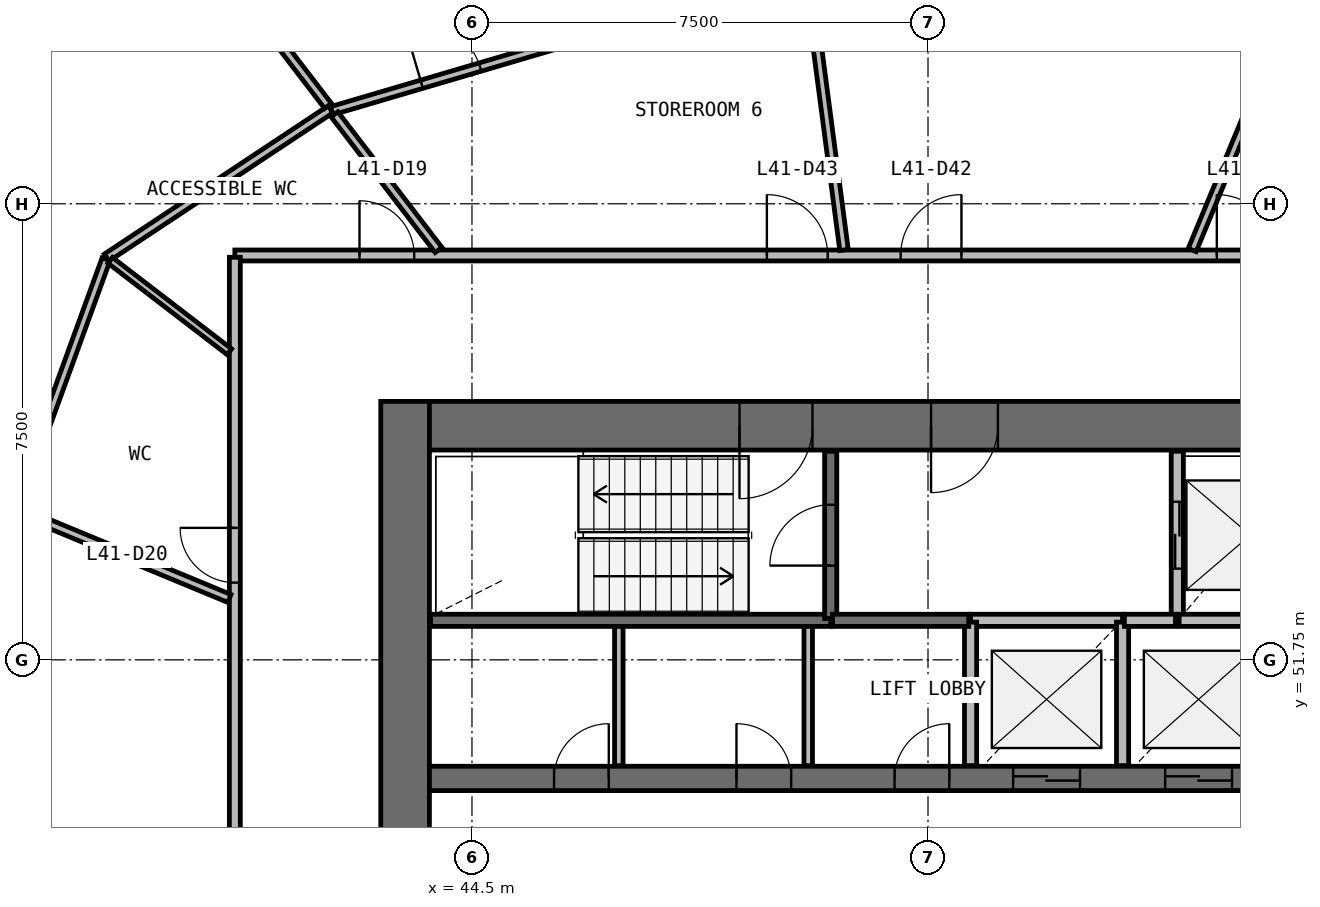
"""IFC4 building model, lengths in metres.
Left out: names, types, materials, properties, quantities, classifications, styles, units other than length and angle.
Written with IfcOpenShell. Run it as: python <this file> out.ifc"""

import sys

from ifc_helpers import new_model, si_unit, direction, frame, frame_2d, origin, place, context, subcontext, project, spatial, rectangle, extrude, source, transform, mapped, element, fill, save


model = new_model("IFC4")
c1 = context("Model", 3, precision=1e-05, world=origin(), true_north=direction((0.0, 1.0)))
c2 = subcontext(c1, "Body", "Model", "MODEL_VIEW")
j1 = project(units=[si_unit("LENGTHUNIT", "METRE"), si_unit("PLANEANGLEUNIT", "RADIAN")], contexts=[c1])
p1 = place(None, origin())
s1 = spatial("IfcSite", under=j1, at=p1, CompositionType="ELEMENT")
p2 = place(p1, origin())
s2 = spatial("IfcBuilding", under=s1, at=p2, CompositionType="ELEMENT")
p3 = place(p2, frame((0.0, 0.0, 172.1)))
s3 = spatial("IfcBuildingStorey", under=s2, at=p3, CompositionType="ELEMENT", Elevation=172.1)
p4 = place(p3, frame((43.4, 56.0, 0.0), z_axis=(0.0, 0.0, 1.0), x_axis=(0.0, -1.0, 0.0)))
e1 = element("IfcWall", 1, at=p4, inside=s3, PredefinedType="SHEAR", context=c2, shape_type="SweptSolid", body=[
    extrude(rectangle(XDim=16.0, YDim=0.8, at=frame_2d((8.0, 0.0))), origin(), (0.0, 0.0, 1.0), 3.9),
])
p5 = place(p4, frame((7.1, 0.0, 0.0)))
e2 = element("IfcOpeningElement", 2, at=p5, cuts=e1, PredefinedType="OPENING", context=c2, shape_type="SweptSolid", body=[
    extrude(rectangle(XDim=1.8, YDim=2.1, at=frame_2d((0.9, 1.05))), frame((0.0, 0.41, 0.0), z_axis=(0.0, -1.0, 0.0), x_axis=(1.0, 0.0, 0.0)), (0.0, 0.0, 1.0), 0.82),
])
p6 = place(p3, frame((60.2, 55.6, 0.0), z_axis=(0.0, 0.0, 1.0), x_axis=(-1.0, 0.0, 0.0)))
e3 = element("IfcWall", 3, at=p6, inside=s3, PredefinedType="SHEAR", context=c2, shape_type="SweptSolid", body=[
    extrude(rectangle(XDim=16.4, YDim=0.8, at=frame_2d((8.2, 0.0))), origin(), (0.0, 0.0, 1.0), 3.9),
])
p7 = place(p6, frame((0.2, 0.0, 0.0)))
e4 = element("IfcOpeningElement", 4, at=p7, cuts=e3, PredefinedType="OPENING", context=c2, shape_type="SweptSolid", body=[
    extrude(rectangle(XDim=1.1, YDim=2.1, at=frame_2d((0.55, 1.05))), frame((0.0, 0.41, 0.0), z_axis=(0.0, -1.0, 0.0), x_axis=(1.0, 0.0, 0.0)), (0.0, 0.0, 1.0), 0.82),
])
p8 = place(p6, frame((10.1, 0.0, 0.0)))
e5 = element("IfcOpeningElement", 5, at=p8, cuts=e3, PredefinedType="OPENING", context=c2, shape_type="SweptSolid", body=[
    extrude(rectangle(XDim=1.2, YDim=2.1, at=frame_2d((0.6, 1.05))), frame((0.0, 0.41, 0.0), z_axis=(0.0, -1.0, 0.0), x_axis=(1.0, 0.0, 0.0)), (0.0, 0.0, 1.0), 0.82),
])
p9 = place(p6, frame((7.05, 0.0, 0.0)))
e6 = element("IfcOpeningElement", 6, at=p9, cuts=e3, PredefinedType="OPENING", context=c2, shape_type="SweptSolid", body=[
    extrude(rectangle(XDim=1.1, YDim=2.1, at=frame_2d((0.55, 1.05))), frame((0.0, 0.41, 0.0), z_axis=(0.0, -1.0, 0.0), x_axis=(1.0, 0.0, 0.0)), (0.0, 0.0, 1.0), 0.82),
])
p10 = place(p3, frame((43.8, 49.8, 0.0), z_axis=(0.0, 0.0, 1.0), x_axis=(1.0, 0.0, 0.0)))
e7 = element("IfcWall", 7, at=p10, inside=s3, PredefinedType="SHEAR", context=c2, shape_type="SweptSolid", body=[
    extrude(rectangle(XDim=16.4, YDim=0.4, at=frame_2d((8.2, 0.0))), origin(), (0.0, 0.0, 1.0), 3.9),
])
p11 = place(p10, frame((9.6, 0.0, 0.0)))
e8 = element("IfcOpeningElement", 8, at=p11, cuts=e7, PredefinedType="OPENING", context=c2, shape_type="SweptSolid", body=[
    extrude(rectangle(XDim=1.1, YDim=2.1, at=frame_2d((0.55, 1.05))), frame((0.0, 0.21, 0.0), z_axis=(0.0, -1.0, 0.0), x_axis=(1.0, 0.0, 0.0)), (0.0, 0.0, 1.0), 0.42),
])
p12 = place(p10, frame((12.1, 0.0, 0.0)))
e9 = element("IfcOpeningElement", 9, at=p12, cuts=e7, PredefinedType="OPENING", context=c2, shape_type="SweptSolid", body=[
    extrude(rectangle(XDim=1.1, YDim=2.1, at=frame_2d((0.55, 1.05))), frame((0.0, 0.21, 0.0), z_axis=(0.0, -1.0, 0.0), x_axis=(1.0, 0.0, 0.0)), (0.0, 0.0, 1.0), 0.42),
])
p13 = place(p10, frame((14.6, 0.0, 0.0)))
e10 = element("IfcOpeningElement", 10, at=p13, cuts=e7, PredefinedType="OPENING", context=c2, shape_type="SweptSolid", body=[
    extrude(rectangle(XDim=1.1, YDim=2.1, at=frame_2d((0.55, 1.05))), frame((0.0, 0.21, 0.0), z_axis=(0.0, -1.0, 0.0), x_axis=(1.0, 0.0, 0.0)), (0.0, 0.0, 1.0), 0.42),
])
p14 = place(p10, frame((2.05, 0.0, 0.0)))
e11 = element("IfcOpeningElement", 11, at=p14, cuts=e7, PredefinedType="OPENING", context=c2, shape_type="SweptSolid", body=[
    extrude(rectangle(XDim=0.9, YDim=2.1, at=frame_2d((0.45, 1.05))), frame((0.0, 0.21, 0.0), z_axis=(0.0, -1.0, 0.0), x_axis=(1.0, 0.0, 0.0)), (0.0, 0.0, 1.0), 0.42),
])
p15 = place(p10, frame((5.05, 0.0, 0.0)))
e12 = element("IfcOpeningElement", 12, at=p15, cuts=e7, PredefinedType="OPENING", context=c2, shape_type="SweptSolid", body=[
    extrude(rectangle(XDim=0.9, YDim=2.1, at=frame_2d((0.45, 1.05))), frame((0.0, 0.21, 0.0), z_axis=(0.0, -1.0, 0.0), x_axis=(1.0, 0.0, 0.0)), (0.0, 0.0, 1.0), 0.42),
])
p16 = place(p10, frame((7.65, 0.0, 0.0)))
e13 = element("IfcOpeningElement", 13, at=p16, cuts=e7, PredefinedType="OPENING", context=c2, shape_type="SweptSolid", body=[
    extrude(rectangle(XDim=0.9, YDim=2.1, at=frame_2d((0.45, 1.05))), frame((0.0, 0.21, 0.0), z_axis=(0.0, -1.0, 0.0), x_axis=(1.0, 0.0, 0.0)), (0.0, 0.0, 1.0), 0.42),
])
p17 = place(p3, frame((43.82, 52.4, 0.0), z_axis=(0.0, 0.0, 1.0), x_axis=(1.0, 0.0, 0.0)))
e14 = element("IfcWall", 14, at=p17, inside=s3, PredefinedType="SOLIDWALL", context=c2, shape_type="SweptSolid", body=[
    extrude(rectangle(XDim=6.58, YDim=0.2, at=frame_2d((3.29, 0.0))), origin(), (0.0, 0.0, 1.0), 3.58),
])
p18 = place(p3, frame((50.4, 52.43, 0.0), z_axis=(0.0, 0.0, 1.0), x_axis=(0.0, 1.0, 0.0)))
e15 = element("IfcWall", 15, at=p18, inside=s3, PredefinedType="SOLIDWALL", context=c2, shape_type="SweptSolid", body=[
    extrude(rectangle(XDim=2.75, YDim=0.2, at=frame_2d((1.375, 0.0))), origin(), (0.0, 0.0, 1.0), 3.58),
])
p19 = place(p18, frame((0.87, 0.0, 0.0)))
e16 = element("IfcOpeningElement", 16, at=p19, cuts=e15, PredefinedType="OPENING", context=c2, shape_type="SweptSolid", body=[
    extrude(rectangle(XDim=1.0, YDim=2.1, at=frame_2d((0.5, 1.05))), frame((0.0, 0.11, 0.0), z_axis=(0.0, -1.0, 0.0), x_axis=(1.0, 0.0, 0.0)), (0.0, 0.0, 1.0), 0.22),
])
p20 = place(p3, frame((56.1, 55.18, 0.0), z_axis=(0.0, 0.0, 1.0), x_axis=(0.0, -1.0, 0.0)))
e17 = element("IfcWall", 17, at=p20, inside=s3, PredefinedType="SOLIDWALL", context=c2, shape_type="SweptSolid", body=[
    extrude(rectangle(XDim=2.78, YDim=0.2, at=frame_2d((1.39, 0.0))), origin(), (0.0, 0.0, 1.0), 3.58),
])
p21 = place(p20, frame((0.83, 0.0, 0.0)))
e18 = element("IfcOpeningElement", 18, at=p21, cuts=e17, PredefinedType="OPENING", context=c2, shape_type="SweptSolid", body=[
    extrude(rectangle(XDim=1.1, YDim=2.1, at=frame_2d((0.55, 1.05))), frame((0.0, 0.11, 0.0), z_axis=(0.0, -1.0, 0.0), x_axis=(1.0, 0.0, 0.0)), (0.0, 0.0, 1.0), 0.22),
])
p22 = place(p3, frame((55.2, 52.4, 0.0), z_axis=(0.0, 0.0, 1.0), x_axis=(-1.0, 0.0, 0.0)))
e19 = element("IfcWall", 19, at=p22, inside=s3, PredefinedType="SOLIDWALL", context=c2, shape_type="SweptSolid", body=[
    extrude(rectangle(XDim=2.5, YDim=0.2, at=frame_2d((1.25, 0.0))), origin(), (0.0, 0.0, 1.0), 3.58),
])
for number, where, z_axis, x_axis in (
    (20, (52.7, 52.37, 0.0), (0.0, 0.0, 1.0), (0.0, -1.0, 0.0)),
    (21, (55.2, 50.01, 0.0), (0.0, 0.0, 1.0), (0.0, 1.0, 0.0)),
):
    element("IfcWall", number, at=place(p3, frame(where, z_axis=z_axis, x_axis=x_axis)), inside=s3, PredefinedType="SOLIDWALL", context=c2, shape_type="SweptSolid", body=[
        extrude(rectangle(XDim=2.36, YDim=0.2, at=frame_2d((1.18, 0.0))), origin(), (0.0, 0.0, 1.0), 3.58),
    ])
p23 = place(p3, frame((50.43, 52.4, 0.0), z_axis=(0.0, 0.0, 1.0), x_axis=(1.0, 0.0, 0.0)))
e22 = element("IfcWall", 22, at=p23, inside=s3, PredefinedType="SOLIDWALL", context=c2, shape_type="SweptSolid", body=[
    extrude(rectangle(XDim=2.24, YDim=0.2, at=frame_2d((1.12, 0.0))), origin(), (0.0, 0.0, 1.0), 3.58),
])
p24 = place(p3, frame((57.67, 52.4, 0.0), z_axis=(0.0, 0.0, 1.0), x_axis=(-1.0, 0.0, 0.0)))
e23 = element("IfcWall", 23, at=p24, inside=s3, PredefinedType="SOLIDWALL", context=c2, shape_type="SweptSolid", body=[
    extrude(rectangle(XDim=1.54, YDim=0.2, at=frame_2d((0.77, 0.0))), origin(), (0.0, 0.0, 1.0), 3.58),
])
p25 = place(p3, frame((56.07, 52.4, 0.0), z_axis=(0.0, 0.0, 1.0), x_axis=(-1.0, 0.0, 0.0)))
e24 = element("IfcWall", 24, at=p25, inside=s3, PredefinedType="SOLIDWALL", context=c2, shape_type="SweptSolid", body=[
    extrude(rectangle(XDim=0.84, YDim=0.2, at=frame_2d((0.42, 0.0))), origin(), (0.0, 0.0, 1.0), 3.58),
])
p26 = place(p3, frame((40.6, 58.4, 0.0), z_axis=(0.0, 0.0, 1.0), x_axis=(1.0, 0.0, 0.0)))
e25 = element("IfcWall", 25, at=p26, inside=s3, PredefinedType="PARTITIONING", context=c2, shape_type="SweptSolid", body=[
    extrude(rectangle(XDim=22.8, YDim=0.18, at=frame_2d((11.4, 0.0))), origin(), (0.0, 0.0, 1.0), 2.88),
])
p27 = place(p26, frame((2.05, 0.0, 0.0)))
e26 = element("IfcOpeningElement", 26, at=p27, cuts=e25, PredefinedType="OPENING", context=c2, shape_type="SweptSolid", body=[
    extrude(rectangle(XDim=0.9, YDim=2.1, at=frame_2d((0.45, 1.05))), frame((0.0, 0.1, 0.0), z_axis=(0.0, -1.0, 0.0), x_axis=(1.0, 0.0, 0.0)), (0.0, 0.0, 1.0), 0.2),
])
p28 = place(p26, frame((16.15, 0.0, 0.0)))
e27 = element("IfcOpeningElement", 27, at=p28, cuts=e25, PredefinedType="OPENING", context=c2, shape_type="SweptSolid", body=[
    extrude(rectangle(XDim=1.0, YDim=2.1, at=frame_2d((0.5, 1.05))), frame((0.0, 0.1, 0.0), z_axis=(0.0, -1.0, 0.0), x_axis=(1.0, 0.0, 0.0)), (0.0, 0.0, 1.0), 0.2),
])
p29 = place(p26, frame((10.95, 0.0, 0.0)))
e28 = element("IfcOpeningElement", 28, at=p29, cuts=e25, PredefinedType="OPENING", context=c2, shape_type="SweptSolid", body=[
    extrude(rectangle(XDim=1.0, YDim=2.1, at=frame_2d((0.5, 1.05))), frame((0.0, 0.1, 0.0), z_axis=(0.0, -1.0, 0.0), x_axis=(1.0, 0.0, 0.0)), (0.0, 0.0, 1.0), 0.2),
])
p30 = place(p26, frame((8.75, 0.0, 0.0)))
e29 = element("IfcOpeningElement", 29, at=p30, cuts=e25, PredefinedType="OPENING", context=c2, shape_type="SweptSolid", body=[
    extrude(rectangle(XDim=1.0, YDim=2.1, at=frame_2d((0.5, 1.05))), frame((0.0, 0.1, 0.0), z_axis=(0.0, -1.0, 0.0), x_axis=(1.0, 0.0, 0.0)), (0.0, 0.0, 1.0), 0.2),
])
p31 = place(p3, frame((40.6, 37.63, 0.0), z_axis=(0.0, 0.0, 1.0), x_axis=(0.0, 1.0, 0.0)))
e30 = element("IfcWall", 30, at=p31, inside=s3, PredefinedType="PARTITIONING", context=c2, shape_type="SweptSolid", body=[
    extrude(rectangle(XDim=20.74, YDim=0.18, at=frame_2d((10.37, 0.0))), origin(), (0.0, 0.0, 1.0), 2.88),
])
p32 = place(p31, frame((15.39, 0.0, 0.0)))
e31 = element("IfcOpeningElement", 31, at=p32, cuts=e30, PredefinedType="OPENING", context=c2, shape_type="SweptSolid", body=[
    extrude(rectangle(XDim=0.9, YDim=2.1, at=frame_2d((0.45, 1.05))), frame((0.0, 0.1, 0.0), z_axis=(0.0, -1.0, 0.0), x_axis=(1.0, 0.0, 0.0)), (0.0, 0.0, 1.0), 0.2),
])
p33 = place(p31, frame((9.89, 0.0, 0.0)))
e32 = element("IfcOpeningElement", 32, at=p33, cuts=e30, PredefinedType="OPENING", context=c2, shape_type="SweptSolid", body=[
    extrude(rectangle(XDim=1.0, YDim=2.1, at=frame_2d((0.5, 1.05))), frame((0.0, 0.1, 0.0), z_axis=(0.0, -1.0, 0.0), x_axis=(1.0, 0.0, 0.0)), (0.0, 0.0, 1.0), 0.2),
])
p34 = place(p3, frame((50.619, 58.49, 0.0), z_axis=(0.0, 0.0, 1.0), x_axis=(-0.130550630931, 0.99144164365, 0.0)))
e33 = element("IfcWall", 33, at=p34, inside=s3, PredefinedType="PARTITIONING", context=c2, shape_type="SweptSolid", body=[
    extrude(rectangle(XDim=4.402, YDim=0.14, at=frame_2d((2.201, 0.0))), origin(), (0.0, 0.0, 1.0), 2.88),
])
p35 = place(p3, frame((42.175, 60.804, 0.0), z_axis=(0.0, 0.0, 1.0), x_axis=(-0.833696109899, -0.552223502162, 0.0)))
e34 = element("IfcWall", 34, at=p35, inside=s3, PredefinedType="PARTITIONING", context=c2, shape_type="SweptSolid", body=[
    extrude(rectangle(XDim=4.417, YDim=0.14, at=frame_2d((2.209, 0.0))), origin(), (0.0, 0.0, 1.0), 2.88),
])
p36 = place(p3, frame((38.482, 58.337, 0.0), z_axis=(0.0, 0.0, 1.0), x_axis=(-0.341774383975, -0.939782033484, 0.0)))
e35 = element("IfcWall", 35, at=p36, inside=s3, PredefinedType="PARTITIONING", context=c2, shape_type="SweptSolid", body=[
    extrude(rectangle(XDim=4.381, YDim=0.14, at=frame_2d((2.19, 0.0))), origin(), (0.0, 0.0, 1.0), 2.88),
])
p37 = place(p3, frame((42.193, 60.781, 0.0), z_axis=(0.0, 0.0, 1.0), x_axis=(0.959388676041, 0.282087518838, 0.0)))
e36 = element("IfcWall", 36, at=p37, inside=s3, PredefinedType="PARTITIONING", context=c2, shape_type="SweptSolid", body=[
    extrude(rectangle(XDim=4.193, YDim=0.14, at=frame_2d((2.097, 0.0))), origin(), (0.0, 0.0, 1.0), 2.88),
])
p38 = place(p37, frame((1.543, 0.0, 0.0)))
e37 = element("IfcOpeningElement", 37, at=p38, cuts=e36, PredefinedType="OPENING", context=c2, shape_type="SweptSolid", body=[
    extrude(rectangle(XDim=1.0, YDim=2.1, at=frame_2d((0.5, 1.05))), frame((0.0, 0.08, 0.0), z_axis=(0.0, -1.0, 0.0), x_axis=(1.0, 0.0, 0.0)), (0.0, 0.0, 1.0), 0.16),
])
p39 = place(p3, frame((56.345, 58.49, 0.0), z_axis=(0.0, 0.0, 1.0), x_axis=(0.382659985547, 0.923889244153, 0.0)))
e38 = element("IfcWall", 38, at=p39, inside=s3, PredefinedType="PARTITIONING", context=c2, shape_type="SweptSolid", body=[
    extrude(rectangle(XDim=3.965, YDim=0.14, at=frame_2d((1.982, 0.0))), origin(), (0.0, 0.0, 1.0), 2.88),
])
p40 = place(p3, frame((40.51, 52.759, 0.0), z_axis=(0.0, 0.0, 1.0), x_axis=(-0.923870623115, 0.382704940842, 0.0)))
e39 = element("IfcWall", 39, at=p40, inside=s3, PredefinedType="PARTITIONING", context=c2, shape_type="SweptSolid", body=[
    extrude(rectangle(XDim=3.785, YDim=0.14, at=frame_2d((1.893, 0.0))), origin(), (0.0, 0.0, 1.0), 2.88),
])
p41 = place(p3, frame((43.951, 58.49, 0.0), z_axis=(0.0, 0.0, 1.0), x_axis=(-0.608715851353, 0.793388311177, 0.0)))
e40 = element("IfcWall", 40, at=p41, inside=s3, PredefinedType="PARTITIONING", context=c2, shape_type="SweptSolid", body=[
    extrude(rectangle(XDim=2.812, YDim=0.14, at=frame_2d((1.406, 0.0))), origin(), (0.0, 0.0, 1.0), 2.88),
])
for number, where, z_axis, x_axis in (
    (41, (46.915, 50.01, 0.0), (0.0, 0.0, 1.0), (0.0, 1.0, 0.0)),
    (42, (50.03, 50.01, 0.0), (0.0, 0.0, 1.0), (0.0, 1.0, 0.0)),
):
    element("IfcWall", number, at=place(p3, frame(where, z_axis=z_axis, x_axis=x_axis)), inside=s3, PredefinedType="PARTITIONING", context=c2, shape_type="SweptSolid", body=[
        extrude(rectangle(XDim=2.29, YDim=0.14, at=frame_2d((1.145, 0.0))), origin(), (0.0, 0.0, 1.0), 2.88),
    ])
p42 = place(p3, frame((42.132, 60.86, 0.0), z_axis=(0.0, 0.0, 1.0), x_axis=(-0.60873458163, 0.793373940288, 0.0)))
e43 = element("IfcWall", 43, at=p42, inside=s3, PredefinedType="PARTITIONING", context=c2, shape_type="SweptSolid", body=[
    extrude(rectangle(XDim=2.249, YDim=0.14, at=frame_2d((1.125, 0.0))), origin(), (0.0, 0.0, 1.0), 2.88),
])
p43 = place(p3, frame((40.51, 56.817, 0.0), z_axis=(0.0, 0.0, 1.0), x_axis=(-0.79340260872, 0.608697215762, 0.0)))
e44 = element("IfcWall", 44, at=p43, inside=s3, PredefinedType="PARTITIONING", context=c2, shape_type="SweptSolid", body=[
    extrude(rectangle(XDim=2.469, YDim=0.12, at=frame_2d((1.234, 0.0))), origin(), (0.0, 0.0, 1.0), 2.88),
])
m1 = source(origin(), c2, "Body", "SweptSolid", [
    extrude(rectangle(XDim=1.1, YDim=2.1, at=frame_2d((0.55, 1.05))), frame((0.0, 0.025, 0.0), z_axis=(0.0, -1.0, 0.0), x_axis=(1.0, 0.0, 0.0)), (0.0, 0.0, 1.0), 0.05),
])
p44 = place(p11, origin())
e45 = element("IfcDoor", 45, at=p44, inside=s3, OperationType="DOUBLE_DOOR_SLIDING", PredefinedType="USERDEFINED", context=c2, shape_type="MappedRepresentation", body=[
    mapped(m1, transform((0.0, 0.0, 0.0), scale=1.0)),
])
fill(e8, e45)
p45 = place(p12, origin())
e46 = element("IfcDoor", 46, at=p45, inside=s3, OperationType="DOUBLE_DOOR_SLIDING", PredefinedType="USERDEFINED", context=c2, shape_type="MappedRepresentation", body=[
    mapped(m1, transform((0.0, 0.0, 0.0), scale=1.0)),
])
fill(e9, e46)
p46 = place(p21, origin())
e47 = element("IfcDoor", 47, at=p46, inside=s3, OperationType="DOUBLE_DOOR_SLIDING", PredefinedType="USERDEFINED", context=c2, shape_type="MappedRepresentation", body=[
    mapped(m1, transform((0.0, 0.0, 0.0), scale=1.0)),
])
fill(e18, e47)
m2 = source(origin(), c2, "Body", "SweptSolid", [
    extrude(rectangle(XDim=1.2, YDim=2.1, at=frame_2d((0.6, 1.05))), frame((0.0, 0.025, 0.0), z_axis=(0.0, -1.0, 0.0), x_axis=(1.0, 0.0, 0.0)), (0.0, 0.0, 1.0), 0.05),
])
p47 = place(p8, origin())
e48 = element("IfcDoor", 48, at=p47, inside=s3, OperationType="SINGLE_SWING_RIGHT", PredefinedType="DOOR", context=c2, shape_type="MappedRepresentation", body=[
    mapped(m2, transform((0.0, 0.0, 0.0), scale=1.0)),
])
fill(e5, e48)
m3 = source(origin(), c2, "Body", "SweptSolid", [
    extrude(rectangle(XDim=1.0, YDim=2.1, at=frame_2d((0.5, 1.05))), frame((0.0, 0.025, 0.0), z_axis=(0.0, -1.0, 0.0), x_axis=(1.0, 0.0, 0.0)), (0.0, 0.0, 1.0), 0.05),
])
p48 = place(p19, origin())
e49 = element("IfcDoor", 49, at=p48, inside=s3, OperationType="SINGLE_SWING_LEFT", PredefinedType="DOOR", context=c2, shape_type="MappedRepresentation", body=[
    mapped(m3, transform((0.0, 0.0, 0.0), scale=1.0)),
])
fill(e16, e49)
m4 = source(origin(), c2, "Body", "SweptSolid", [
    extrude(rectangle(XDim=1.1, YDim=2.1, at=frame_2d((0.55, 1.05))), frame((0.0, 0.025, 0.0), z_axis=(0.0, -1.0, 0.0), x_axis=(1.0, 0.0, 0.0)), (0.0, 0.0, 1.0), 0.05),
])
p49 = place(p9, origin())
e50 = element("IfcDoor", 50, at=p49, inside=s3, OperationType="SINGLE_SWING_RIGHT", PredefinedType="DOOR", context=c2, shape_type="MappedRepresentation", body=[
    mapped(m4, transform((0.0, 0.0, 0.0), scale=1.0)),
])
fill(e6, e50)
m5 = source(origin(), c2, "Body", "SweptSolid", [
    extrude(rectangle(XDim=0.9, YDim=2.1, at=frame_2d((0.45, 1.05))), frame((0.0, 0.025, 0.0), z_axis=(0.0, -1.0, 0.0), x_axis=(1.0, 0.0, 0.0)), (0.0, 0.0, 1.0), 0.05),
])
p50 = place(p27, origin())
e51 = element("IfcDoor", 51, at=p50, inside=s3, OperationType="SINGLE_SWING_LEFT", PredefinedType="DOOR", context=c2, shape_type="MappedRepresentation", body=[
    mapped(m5, transform((0.0, 0.0, 0.0), scale=1.0)),
])
fill(e26, e51)
p51 = place(p32, origin())
e52 = element("IfcDoor", 52, at=p51, inside=s3, OperationType="SINGLE_SWING_RIGHT", PredefinedType="DOOR", context=c2, shape_type="MappedRepresentation", body=[
    mapped(m5, transform((0.0, 0.0, 0.0), scale=1.0)),
])
fill(e31, e52)
m6 = source(origin(), c2, "Body", "SweptSolid", [
    extrude(rectangle(XDim=1.0, YDim=2.1, at=frame_2d((0.5, 1.05))), frame((0.0, 0.025, 0.0), z_axis=(0.0, -1.0, 0.0), x_axis=(1.0, 0.0, 0.0)), (0.0, 0.0, 1.0), 0.05),
])
p52 = place(p28, origin())
e53 = element("IfcDoor", 53, at=p52, inside=s3, OperationType="SINGLE_SWING_LEFT", PredefinedType="DOOR", context=c2, shape_type="MappedRepresentation", body=[
    mapped(m6, transform((0.0, 0.0, 0.0), scale=1.0)),
])
fill(e27, e53)
p53 = place(p29, origin())
e54 = element("IfcDoor", 54, at=p53, inside=s3, OperationType="SINGLE_SWING_RIGHT", PredefinedType="DOOR", context=c2, shape_type="MappedRepresentation", body=[
    mapped(m6, transform((0.0, 0.0, 0.0), scale=1.0)),
])
fill(e28, e54)
p54 = place(p30, origin())
e55 = element("IfcDoor", 55, at=p54, inside=s3, OperationType="SINGLE_SWING_LEFT", PredefinedType="DOOR", context=c2, shape_type="MappedRepresentation", body=[
    mapped(m6, transform((0.0, 0.0, 0.0), scale=1.0)),
])
fill(e29, e55)
p55 = place(p38, origin())
e56 = element("IfcDoor", 56, at=p55, inside=s3, OperationType="SINGLE_SWING_LEFT", PredefinedType="DOOR", context=c2, shape_type="MappedRepresentation", body=[
    mapped(m6, transform((0.0, 0.0, 0.0), scale=1.0)),
])
fill(e37, e56)
m7 = source(origin(), c2, "Body", "SweptSolid", [
    extrude(rectangle(XDim=0.9, YDim=2.1, at=frame_2d((0.45, 1.05))), frame((0.0, 0.025, 0.0), z_axis=(0.0, -1.0, 0.0), x_axis=(1.0, 0.0, 0.0)), (0.0, 0.0, 1.0), 0.05),
])
p56 = place(p14, origin())
e57 = element("IfcDoor", 57, at=p56, inside=s3, OperationType="SINGLE_SWING_RIGHT", PredefinedType="DOOR", context=c2, shape_type="MappedRepresentation", body=[
    mapped(m7, transform((0.0, 0.0, 0.0), scale=1.0)),
])
fill(e11, e57)
p57 = place(p15, origin())
e58 = element("IfcDoor", 58, at=p57, inside=s3, OperationType="SINGLE_SWING_LEFT", PredefinedType="DOOR", context=c2, shape_type="MappedRepresentation", body=[
    mapped(m7, transform((0.0, 0.0, 0.0), scale=1.0)),
])
fill(e12, e58)
p58 = place(p16, origin())
e59 = element("IfcDoor", 59, at=p58, inside=s3, OperationType="SINGLE_SWING_RIGHT", PredefinedType="DOOR", context=c2, shape_type="MappedRepresentation", body=[
    mapped(m7, transform((0.0, 0.0, 0.0), scale=1.0)),
])
fill(e13, e59)
save(model, sys.argv[1])
